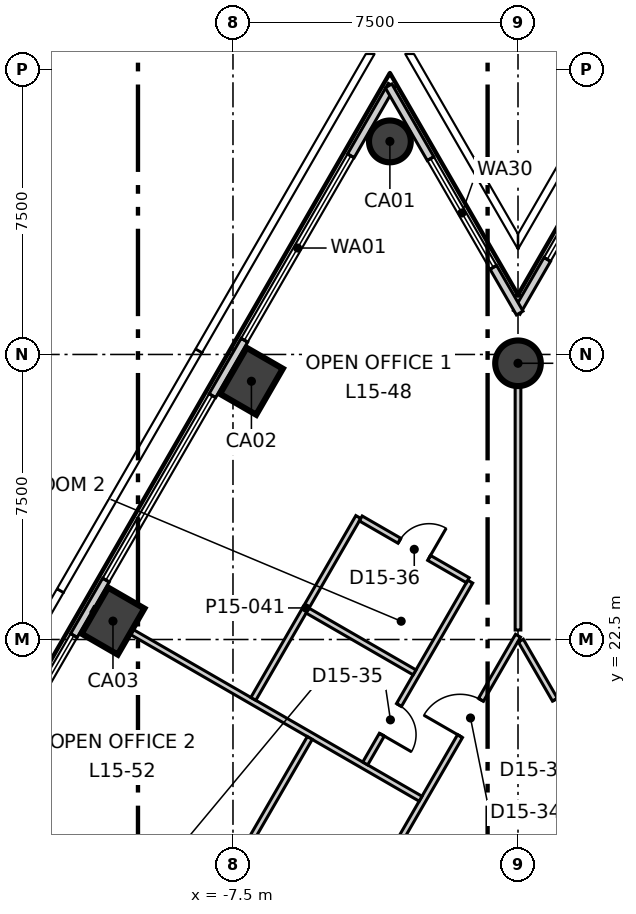
"""IFC4 building model, lengths in metres.
Left out: names, types, materials, properties, quantities, classifications, styles, units other than length and angle.
Written with IfcOpenShell. Run it as: python <this file> out.ifc"""

import sys

from ifc_helpers import new_model, si_unit, direction, frame, frame_2d, origin, origin_2d, place, context, subcontext, project, spatial, rectangle, circle, extrude, element, fill, save


model = new_model("IFC4")
c1 = context("Model", 3, precision=1e-05, world=origin(), true_north=direction((0.0, 1.0)))
c2 = subcontext(c1, "Body", "Model", "MODEL_VIEW")
j1 = project(units=[si_unit("LENGTHUNIT", "METRE"), si_unit("PLANEANGLEUNIT", "RADIAN")], contexts=[c1])
p1 = place(None, origin())
s1 = spatial("IfcSite", under=j1, at=p1, CompositionType="ELEMENT")
p2 = place(p1, origin())
s2 = spatial("IfcBuilding", under=s1, at=p2, CompositionType="ELEMENT")
p3 = place(p2, frame((0.0, 0.0, 71.3)))
s3 = spatial("IfcBuildingStorey", under=s2, at=p3, CompositionType="ELEMENT", Elevation=71.3)
p4 = place(p3, frame((-3.371, 35.606, -0.3), z_axis=(0.0, 0.0, 1.0), x_axis=(0.5, 0.866025403784, 0.0)))
e1 = element("IfcColumn", 1, at=p4, inside=s3, PredefinedType="COLUMN", context=c2, shape_type="SweptSolid", body=[
    extrude(circle(Radius=0.55, at=origin_2d()), origin(), (0.0, 0.0, 1.0), 4.0),
])
for number, where, z_axis, x_axis in (
    (2, (-7.015, 29.295, -0.3), (0.0, 0.0, 1.0), (0.5, 0.866, 0.0)),
    (3, (-10.658, 22.984, -0.3), (0.0, 0.0, 1.0), (0.5, 0.866, 0.0)),
):
    element("IfcColumn", number, at=place(p3, frame(where, z_axis=z_axis, x_axis=x_axis)), inside=s3, PredefinedType="COLUMN", context=c2, shape_type="SweptSolid", body=[
        extrude(rectangle(XDim=1.4, YDim=1.1, at=origin_2d()), origin(), (0.0, 0.0, 1.0), 4.0),
    ])
p5 = place(p3, frame((0.0, 29.768, -0.3), z_axis=(0.0, 0.0, 1.0), x_axis=(1.0, 0.0, 0.0)))
e4 = element("IfcColumn", 4, at=p5, inside=s3, PredefinedType="COLUMN", context=c2, shape_type="SweptSolid", body=[
    extrude(circle(Radius=0.6, at=origin_2d()), origin(), (0.0, 0.0, 1.0), 4.0),
])
p6 = place(p3, frame((-3.326, 37.084, 0.0), z_axis=(0.0, 0.0, 1.0), x_axis=(-0.500000131003, -0.86602532815, 0.0)))
e5 = element("IfcWall", 5, at=p6, inside=s3, PredefinedType="ELEMENTEDWALL", context=c2, shape_type="SweptSolid", body=[
    extrude(rectangle(XDim=60.886, YDim=0.2, at=frame_2d((30.443, 0.0))), origin(), (0.0, 0.0, 1.0), 3.7),
])
p7 = place(p6, frame((2.146, 0.0, 0.9)))
e6 = element("IfcOpeningElement", 6, at=p7, cuts=e5, PredefinedType="OPENING", context=c2, shape_type="SweptSolid", body=[
    extrude(rectangle(XDim=5.6, YDim=2.5, at=frame_2d((2.8, 1.25))), frame((0.0, 0.11, 0.0), z_axis=(0.0, -1.0, 0.0), x_axis=(1.0, 0.0, 0.0)), (0.0, 0.0, 1.0), 0.22),
])
p8 = place(p6, frame((9.434, 0.0, 0.9)))
e7 = element("IfcOpeningElement", 7, at=p8, cuts=e5, PredefinedType="OPENING", context=c2, shape_type="SweptSolid", body=[
    extrude(rectangle(XDim=5.6, YDim=2.5, at=frame_2d((2.8, 1.25))), frame((0.0, 0.11, 0.0), z_axis=(0.0, -1.0, 0.0), x_axis=(1.0, 0.0, 0.0)), (0.0, 0.0, 1.0), 0.22),
])
p9 = place(p6, frame((16.721, 0.0, 0.9)))
e8 = element("IfcOpeningElement", 8, at=p9, cuts=e5, PredefinedType="OPENING", context=c2, shape_type="SweptSolid", body=[
    extrude(rectangle(XDim=5.6, YDim=2.5, at=frame_2d((2.8, 1.25))), frame((0.0, 0.11, 0.0), z_axis=(0.0, -1.0, 0.0), x_axis=(1.0, 0.0, 0.0)), (0.0, 0.0, 1.0), 0.22),
])
p10 = place(p6, frame((24.009, 0.0, 0.9)))
e9 = element("IfcOpeningElement", 9, at=p10, cuts=e5, PredefinedType="OPENING", context=c2, shape_type="SweptSolid", body=[
    extrude(rectangle(XDim=5.6, YDim=2.5, at=frame_2d((2.8, 1.25))), frame((0.0, 0.11, 0.0), z_axis=(0.0, -1.0, 0.0), x_axis=(1.0, 0.0, 0.0)), (0.0, 0.0, 1.0), 0.22),
])
p11 = place(p6, frame((31.297, 0.0, 0.9)))
e10 = element("IfcOpeningElement", 10, at=p11, cuts=e5, PredefinedType="OPENING", context=c2, shape_type="SweptSolid", body=[
    extrude(rectangle(XDim=5.6, YDim=2.5, at=frame_2d((2.8, 1.25))), frame((0.0, 0.11, 0.0), z_axis=(0.0, -1.0, 0.0), x_axis=(1.0, 0.0, 0.0)), (0.0, 0.0, 1.0), 0.22),
])
p12 = place(p6, frame((38.584, 0.0, 0.9)))
e11 = element("IfcOpeningElement", 11, at=p12, cuts=e5, PredefinedType="OPENING", context=c2, shape_type="SweptSolid", body=[
    extrude(rectangle(XDim=5.6, YDim=2.5, at=frame_2d((2.8, 1.25))), frame((0.0, 0.11, 0.0), z_axis=(0.0, -1.0, 0.0), x_axis=(1.0, 0.0, 0.0)), (0.0, 0.0, 1.0), 0.22),
])
p13 = place(p6, frame((45.872, 0.0, 0.9)))
e12 = element("IfcOpeningElement", 12, at=p13, cuts=e5, PredefinedType="OPENING", context=c2, shape_type="SweptSolid", body=[
    extrude(rectangle(XDim=5.6, YDim=2.5, at=frame_2d((2.8, 1.25))), frame((0.0, 0.11, 0.0), z_axis=(0.0, -1.0, 0.0), x_axis=(1.0, 0.0, 0.0)), (0.0, 0.0, 1.0), 0.22),
])
p14 = place(p6, frame((53.159, 0.0, 0.9)))
e13 = element("IfcOpeningElement", 13, at=p14, cuts=e5, PredefinedType="OPENING", context=c2, shape_type="SweptSolid", body=[
    extrude(rectangle(XDim=5.6, YDim=2.5, at=frame_2d((2.8, 1.25))), frame((0.0, 0.11, 0.0), z_axis=(0.0, -1.0, 0.0), x_axis=(1.0, 0.0, 0.0)), (0.0, 0.0, 1.0), 0.22),
])
p15 = place(p3, frame((3.416, 37.084, 0.0), z_axis=(0.0, 0.0, 1.0), x_axis=(-0.500008243208, -0.866020644514, 0.0)))
e14 = element("IfcWall", 14, at=p15, inside=s3, PredefinedType="ELEMENTEDWALL", context=c2, shape_type="SweptSolid", body=[
    extrude(rectangle(XDim=6.902, YDim=0.2, at=frame_2d((3.451, 0.0))), origin(), (0.0, 0.0, 1.0), 3.7),
])
p16 = place(p15, frame((1.99, 0.0, 0.9)))
e15 = element("IfcOpeningElement", 15, at=p16, cuts=e14, PredefinedType="OPENING", context=c2, shape_type="SweptSolid", body=[
    extrude(rectangle(XDim=3.3, YDim=2.5, at=frame_2d((1.65, 1.25))), frame((0.0, 0.11, 0.0), z_axis=(0.0, -1.0, 0.0), x_axis=(1.0, 0.0, 0.0)), (0.0, 0.0, 1.0), 0.22),
])
p17 = place(p3, frame((0.045, 31.09, 0.0), z_axis=(0.0, 0.0, 1.0), x_axis=(-0.500023561059, 0.866011800373, 0.0)))
e16 = element("IfcWall", 16, at=p17, inside=s3, PredefinedType="ELEMENTEDWALL", context=c2, shape_type="SweptSolid", body=[
    extrude(rectangle(XDim=6.902, YDim=0.2, at=frame_2d((3.451, 0.0))), origin(), (0.0, 0.0, 1.0), 3.7),
])
p18 = place(p17, frame((1.39, 0.0, 0.9)))
e17 = element("IfcOpeningElement", 17, at=p18, cuts=e16, PredefinedType="OPENING", context=c2, shape_type="SweptSolid", body=[
    extrude(rectangle(XDim=3.3, YDim=2.5, at=frame_2d((1.65, 1.25))), frame((0.0, 0.11, 0.0), z_axis=(0.0, -1.0, 0.0), x_axis=(1.0, 0.0, 0.0)), (0.0, 0.0, 1.0), 0.22),
])
p19 = place(p3, frame((-19.497, -11.17, 0.0), z_axis=(0.0, 0.0, 1.0), x_axis=(0.499998854553, 0.866026065108, 0.0)))
e18 = element("IfcWall", 18, at=p19, inside=s3, PredefinedType="PARTITIONING", context=c2, shape_type="SweptSolid", body=[
    extrude(rectangle(XDim=38.994, YDim=0.15, at=frame_2d((19.497, 0.0))), origin(), (0.0, 0.0, 1.0), 3.7),
])
p20 = place(p19, frame((35.944, 0.0, 0.0)))
e19 = element("IfcOpeningElement", 19, at=p20, cuts=e18, PredefinedType="OPENING", context=c2, shape_type="SweptSolid", body=[
    extrude(rectangle(XDim=1.1, YDim=2.1, at=frame_2d((0.55, 1.05))), frame((0.0, 0.085, 0.0), z_axis=(0.0, -1.0, 0.0), x_axis=(1.0, 0.0, 0.0)), (0.0, 0.0, 1.0), 0.17),
])
p21 = place(p19, frame((26.148, 0.0, 0.0)))
e20 = element("IfcOpeningElement", 20, at=p21, cuts=e18, PredefinedType="OPENING", context=c2, shape_type="SweptSolid", body=[
    extrude(rectangle(XDim=1.1, YDim=2.1, at=frame_2d((0.55, 1.05))), frame((0.0, 0.085, 0.0), z_axis=(0.0, -1.0, 0.0), x_axis=(1.0, 0.0, 0.0)), (0.0, 0.0, 1.0), 0.17),
])
p22 = place(p19, frame((8.572, 0.0, 0.0)))
e21 = element("IfcOpeningElement", 21, at=p22, cuts=e18, PredefinedType="OPENING", context=c2, shape_type="SweptSolid", body=[
    extrude(rectangle(XDim=1.1, YDim=2.1, at=frame_2d((0.55, 1.05))), frame((0.0, 0.085, 0.0), z_axis=(0.0, -1.0, 0.0), x_axis=(1.0, 0.0, 0.0)), (0.0, 0.0, 1.0), 0.17),
])
p23 = place(p19, frame((17.172, 0.0, 0.0)))
e22 = element("IfcOpeningElement", 22, at=p23, cuts=e18, PredefinedType="OPENING", context=c2, shape_type="SweptSolid", body=[
    extrude(rectangle(XDim=0.9, YDim=2.1, at=frame_2d((0.45, 1.05))), frame((0.0, 0.085, 0.0), z_axis=(0.0, -1.0, 0.0), x_axis=(1.0, 0.0, 0.0)), (0.0, 0.0, 1.0), 0.17),
])
p24 = place(p19, frame((14.172, 0.0, 0.0)))
e23 = element("IfcOpeningElement", 23, at=p24, cuts=e18, PredefinedType="OPENING", context=c2, shape_type="SweptSolid", body=[
    extrude(rectangle(XDim=0.9, YDim=2.1, at=frame_2d((0.45, 1.05))), frame((0.0, 0.085, 0.0), z_axis=(0.0, -1.0, 0.0), x_axis=(1.0, 0.0, 0.0)), (0.0, 0.0, 1.0), 0.17),
])
p25 = place(p19, frame((1.797, 0.0, 0.0)))
e24 = element("IfcOpeningElement", 24, at=p25, cuts=e18, PredefinedType="OPENING", context=c2, shape_type="SweptSolid", body=[
    extrude(rectangle(XDim=1.1, YDim=2.1, at=frame_2d((0.55, 1.05))), frame((0.0, 0.085, 0.0), z_axis=(0.0, -1.0, 0.0), x_axis=(1.0, 0.0, 0.0)), (0.0, 0.0, 1.0), 0.17),
])
p26 = place(p3, frame((-11.195, 23.294, 0.0), z_axis=(0.0, 0.0, 1.0), x_axis=(0.866018758693, -0.500011509459, 0.0)))
e25 = element("IfcWall", 25, at=p26, inside=s3, PredefinedType="PARTITIONING", context=c2, shape_type="SweptSolid", body=[
    extrude(rectangle(XDim=9.968, YDim=0.15, at=frame_2d((4.984, 0.0))), origin(), (0.0, 0.0, 1.0), 3.7),
])
p27 = place(p3, frame((0.0, 22.75, 0.0), z_axis=(0.0, 0.0, 1.0), x_axis=(0.0, 1.0, 0.0)))
e26 = element("IfcWall", 26, at=p27, inside=s3, PredefinedType="PARTITIONING", context=c2, shape_type="SweptSolid", body=[
    extrude(rectangle(XDim=7.638, YDim=0.15, at=frame_2d((3.819, 0.0))), origin(), (0.0, 0.0, 1.0), 3.1),
])
p28 = place(p3, frame((0.075, 22.47, 0.0), z_axis=(0.0, 0.0, 1.0), x_axis=(0.500002280369, -0.866024087209, 0.0)))
e27 = element("IfcWall", 27, at=p28, inside=s3, PredefinedType="PARTITIONING", context=c2, shape_type="SweptSolid", body=[
    extrude(rectangle(XDim=38.844, YDim=0.15, at=frame_2d((19.422, 0.0))), origin(), (0.0, 0.0, 1.0), 3.7),
])
p29 = place(p28, frame((35.944, 0.0, 0.0)))
e28 = element("IfcOpeningElement", 28, at=p29, cuts=e27, PredefinedType="OPENING", context=c2, shape_type="SweptSolid", body=[
    extrude(rectangle(XDim=1.1, YDim=2.1, at=frame_2d((0.55, 1.05))), frame((0.0, 0.085, 0.0), z_axis=(0.0, -1.0, 0.0), x_axis=(1.0, 0.0, 0.0)), (0.0, 0.0, 1.0), 0.17),
])
p30 = place(p28, frame((29.848, 0.0, 0.0)))
e29 = element("IfcOpeningElement", 29, at=p30, cuts=e27, PredefinedType="OPENING", context=c2, shape_type="SweptSolid", body=[
    extrude(rectangle(XDim=1.0, YDim=2.1, at=frame_2d((0.5, 1.05))), frame((0.0, 0.085, 0.0), z_axis=(0.0, -1.0, 0.0), x_axis=(1.0, 0.0, 0.0)), (0.0, 0.0, 1.0), 0.17),
])
p31 = place(p28, frame((14.46, 0.0, 0.0)))
e30 = element("IfcOpeningElement", 30, at=p31, cuts=e27, PredefinedType="OPENING", context=c2, shape_type="SweptSolid", body=[
    extrude(rectangle(XDim=1.1, YDim=2.1, at=frame_2d((0.55, 1.05))), frame((0.0, 0.085, 0.0), z_axis=(0.0, -1.0, 0.0), x_axis=(1.0, 0.0, 0.0)), (0.0, 0.0, 1.0), 0.17),
])
p32 = place(p28, frame((24.66, 0.0, 0.0)))
e31 = element("IfcOpeningElement", 31, at=p32, cuts=e27, PredefinedType="OPENING", context=c2, shape_type="SweptSolid", body=[
    extrude(rectangle(XDim=0.9, YDim=2.1, at=frame_2d((0.45, 1.05))), frame((0.0, 0.085, 0.0), z_axis=(0.0, -1.0, 0.0), x_axis=(1.0, 0.0, 0.0)), (0.0, 0.0, 1.0), 0.17),
])
p33 = place(p28, frame((21.46, 0.0, 0.0)))
e32 = element("IfcOpeningElement", 32, at=p33, cuts=e27, PredefinedType="OPENING", context=c2, shape_type="SweptSolid", body=[
    extrude(rectangle(XDim=0.9, YDim=2.1, at=frame_2d((0.45, 1.05))), frame((0.0, 0.085, 0.0), z_axis=(0.0, -1.0, 0.0), x_axis=(1.0, 0.0, 0.0)), (0.0, 0.0, 1.0), 0.17),
])
p34 = place(p28, frame((18.66, 0.0, 0.0)))
e33 = element("IfcOpeningElement", 33, at=p34, cuts=e27, PredefinedType="OPENING", context=c2, shape_type="SweptSolid", body=[
    extrude(rectangle(XDim=1.0, YDim=2.1, at=frame_2d((0.5, 1.05))), frame((0.0, 0.085, 0.0), z_axis=(0.0, -1.0, 0.0), x_axis=(1.0, 0.0, 0.0)), (0.0, 0.0, 1.0), 0.17),
])
p35 = place(p28, frame((6.785, 0.0, 0.0)))
e34 = element("IfcOpeningElement", 34, at=p35, cuts=e27, PredefinedType="OPENING", context=c2, shape_type="SweptSolid", body=[
    extrude(rectangle(XDim=1.0, YDim=2.1, at=frame_2d((0.5, 1.05))), frame((0.0, 0.085, 0.0), z_axis=(0.0, -1.0, 0.0), x_axis=(1.0, 0.0, 0.0)), (0.0, 0.0, 1.0), 0.17),
])
p36 = place(p28, frame((10.485, 0.0, 0.0)))
e35 = element("IfcOpeningElement", 35, at=p36, cuts=e27, PredefinedType="OPENING", context=c2, shape_type="SweptSolid", body=[
    extrude(rectangle(XDim=0.9, YDim=2.1, at=frame_2d((0.45, 1.05))), frame((0.0, 0.085, 0.0), z_axis=(0.0, -1.0, 0.0), x_axis=(1.0, 0.0, 0.0)), (0.0, 0.0, 1.0), 0.17),
])
p37 = place(p28, frame((1.796, 0.0, 0.0)))
e36 = element("IfcOpeningElement", 36, at=p37, cuts=e27, PredefinedType="OPENING", context=c2, shape_type="SweptSolid", body=[
    extrude(rectangle(XDim=1.1, YDim=2.1, at=frame_2d((0.55, 1.05))), frame((0.0, 0.085, 0.0), z_axis=(0.0, -1.0, 0.0), x_axis=(1.0, 0.0, 0.0)), (0.0, 0.0, 1.0), 0.17),
])
p38 = place(p3, frame((-12.693, 7.415, 0.0), z_axis=(0.0, 0.0, 1.0), x_axis=(0.500017889033, 0.8660150753, 0.0)))
e37 = element("IfcWall", 37, at=p38, inside=s3, PredefinedType="PARTITIONING", context=c2, shape_type="SweptSolid", body=[
    extrude(rectangle(XDim=14.426, YDim=0.15, at=frame_2d((7.213, 0.0))), origin(), (0.0, 0.0, 1.0), 3.7),
])
p39 = place(p38, frame((6.751, 0.0, 0.0)))
e38 = element("IfcOpeningElement", 38, at=p39, cuts=e37, PredefinedType="OPENING", context=c2, shape_type="SweptSolid", body=[
    extrude(rectangle(XDim=1.0, YDim=2.1, at=frame_2d((0.5, 1.05))), frame((0.0, 0.085, 0.0), z_axis=(0.0, -1.0, 0.0), x_axis=(1.0, 0.0, 0.0)), (0.0, 0.0, 1.0), 0.17),
])
p40 = place(p3, frame((-6.964, 20.938, 0.0), z_axis=(0.0, 0.0, 1.0), x_axis=(0.499950687084, 0.866053872738, 0.0)))
e39 = element("IfcWall", 39, at=p40, inside=s3, PredefinedType="PARTITIONING", context=c2, shape_type="SweptSolid", body=[
    extrude(rectangle(XDim=5.525, YDim=0.15, at=frame_2d((2.762, 0.0))), origin(), (0.0, 0.0, 1.0), 3.7),
])
p41 = place(p3, frame((-4.02, 19.238, 0.0), z_axis=(0.0, 0.0, 1.0), x_axis=(0.500050108258, 0.865996471835, 0.0)))
e40 = element("IfcWall", 40, at=p41, inside=s3, PredefinedType="PARTITIONING", context=c2, shape_type="SweptSolid", body=[
    extrude(rectangle(XDim=5.525, YDim=0.15, at=frame_2d((2.763, 0.0))), origin(), (0.0, 0.0, 1.0), 3.7),
])
p42 = place(p41, frame((0.875, 0.0, 0.0)))
e41 = element("IfcOpeningElement", 41, at=p42, cuts=e40, PredefinedType="OPENING", context=c2, shape_type="SweptSolid", body=[
    extrude(rectangle(XDim=0.9, YDim=2.1, at=frame_2d((0.45, 1.05))), frame((0.0, 0.085, 0.0), z_axis=(0.0, -1.0, 0.0), x_axis=(1.0, 0.0, 0.0)), (0.0, 0.0, 1.0), 0.17),
])
p43 = place(p3, frame((-4.137, 25.685, 0.0), z_axis=(0.0, 0.0, 1.0), x_axis=(0.866053003207, -0.499952193351, 0.0)))
e42 = element("IfcWall", 42, at=p43, inside=s3, PredefinedType="PARTITIONING", context=c2, shape_type="SweptSolid", body=[
    extrude(rectangle(XDim=3.25, YDim=0.15, at=frame_2d((1.625, 0.0))), origin(), (0.0, 0.0, 1.0), 3.7),
])
p44 = place(p43, frame((1.175, 0.0, 0.0)))
e43 = element("IfcOpeningElement", 43, at=p44, cuts=e42, PredefinedType="OPENING", context=c2, shape_type="SweptSolid", body=[
    extrude(rectangle(XDim=0.9, YDim=2.1, at=frame_2d((0.45, 1.05))), frame((0.0, 0.085, 0.0), z_axis=(0.0, -1.0, 0.0), x_axis=(1.0, 0.0, 0.0)), (0.0, 0.0, 1.0), 0.17),
])
p45 = place(p3, frame((-5.537, 23.26, 0.0), z_axis=(0.0, 0.0, 1.0), x_axis=(0.866071776036, -0.499919672301, 0.0)))
e44 = element("IfcWall", 44, at=p45, inside=s3, PredefinedType="PARTITIONING", context=c2, shape_type="SweptSolid", body=[
    extrude(rectangle(XDim=3.25, YDim=0.15, at=frame_2d((1.625, 0.0))), origin(), (0.0, 0.0, 1.0), 3.7),
])
p46 = place(p7, origin())
e45 = element("IfcWindow", 45, at=p46, inside=s3, PartitioningType="SINGLE_PANEL", PredefinedType="WINDOW", context=c2, shape_type="SweptSolid", body=[
    extrude(rectangle(XDim=5.6, YDim=2.5, at=frame_2d((2.8, 1.25))), frame((0.0, 0.03, 0.0), z_axis=(0.0, -1.0, 0.0), x_axis=(1.0, 0.0, 0.0)), (0.0, 0.0, 1.0), 0.06),
])
fill(e6, e45)
p47 = place(p8, origin())
e46 = element("IfcWindow", 46, at=p47, inside=s3, PartitioningType="SINGLE_PANEL", PredefinedType="WINDOW", context=c2, shape_type="SweptSolid", body=[
    extrude(rectangle(XDim=5.6, YDim=2.5, at=frame_2d((2.8, 1.25))), frame((0.0, 0.03, 0.0), z_axis=(0.0, -1.0, 0.0), x_axis=(1.0, 0.0, 0.0)), (0.0, 0.0, 1.0), 0.06),
])
fill(e7, e46)
p48 = place(p9, origin())
e47 = element("IfcWindow", 47, at=p48, inside=s3, PartitioningType="SINGLE_PANEL", PredefinedType="WINDOW", context=c2, shape_type="SweptSolid", body=[
    extrude(rectangle(XDim=5.6, YDim=2.5, at=frame_2d((2.8, 1.25))), frame((0.0, 0.03, 0.0), z_axis=(0.0, -1.0, 0.0), x_axis=(1.0, 0.0, 0.0)), (0.0, 0.0, 1.0), 0.06),
])
fill(e8, e47)
p49 = place(p16, origin())
e48 = element("IfcWindow", 48, at=p49, inside=s3, PartitioningType="SINGLE_PANEL", PredefinedType="WINDOW", context=c2, shape_type="SweptSolid", body=[
    extrude(rectangle(XDim=3.3, YDim=2.5, at=frame_2d((1.65, 1.25))), frame((0.0, 0.03, 0.0), z_axis=(0.0, -1.0, 0.0), x_axis=(1.0, 0.0, 0.0)), (0.0, 0.0, 1.0), 0.06),
])
fill(e15, e48)
p50 = place(p18, origin())
e49 = element("IfcWindow", 49, at=p50, inside=s3, PartitioningType="SINGLE_PANEL", PredefinedType="WINDOW", context=c2, shape_type="SweptSolid", body=[
    extrude(rectangle(XDim=3.3, YDim=2.5, at=frame_2d((1.65, 1.25))), frame((0.0, 0.03, 0.0), z_axis=(0.0, -1.0, 0.0), x_axis=(1.0, 0.0, 0.0)), (0.0, 0.0, 1.0), 0.06),
])
fill(e17, e49)
p51 = place(p37, origin())
e50 = element("IfcDoor", 50, at=p51, inside=s3, OperationType="SINGLE_SWING_LEFT", PredefinedType="DOOR", context=c2, shape_type="SweptSolid", body=[
    extrude(rectangle(XDim=1.1, YDim=2.1, at=frame_2d((0.55, 1.05))), frame((0.0, 0.025, 0.0), z_axis=(0.0, -1.0, 0.0), x_axis=(1.0, 0.0, 0.0)), (0.0, 0.0, 1.0), 0.05),
])
fill(e36, e50)
p52 = place(p20, origin())
e51 = element("IfcDoor", 51, at=p52, inside=s3, OperationType="SINGLE_SWING_RIGHT", PredefinedType="DOOR", context=c2, shape_type="SweptSolid", body=[
    extrude(rectangle(XDim=1.1, YDim=2.1, at=frame_2d((0.55, 1.05))), frame((0.0, 0.025, 0.0), z_axis=(0.0, -1.0, 0.0), x_axis=(1.0, 0.0, 0.0)), (0.0, 0.0, 1.0), 0.05),
])
fill(e19, e51)
p53 = place(p42, origin())
e52 = element("IfcDoor", 52, at=p53, inside=s3, OperationType="SINGLE_SWING_LEFT", PredefinedType="DOOR", context=c2, shape_type="SweptSolid", body=[
    extrude(rectangle(XDim=0.9, YDim=2.1, at=frame_2d((0.45, 1.05))), frame((0.0, 0.025, 0.0), z_axis=(0.0, -1.0, 0.0), x_axis=(1.0, 0.0, 0.0)), (0.0, 0.0, 1.0), 0.05),
])
fill(e41, e52)
p54 = place(p44, origin())
e53 = element("IfcDoor", 53, at=p54, inside=s3, OperationType="SINGLE_SWING_LEFT", PredefinedType="DOOR", context=c2, shape_type="SweptSolid", body=[
    extrude(rectangle(XDim=0.9, YDim=2.1, at=frame_2d((0.45, 1.05))), frame((0.0, 0.025, 0.0), z_axis=(0.0, -1.0, 0.0), x_axis=(1.0, 0.0, 0.0)), (0.0, 0.0, 1.0), 0.05),
])
fill(e43, e53)
save(model, sys.argv[1])
